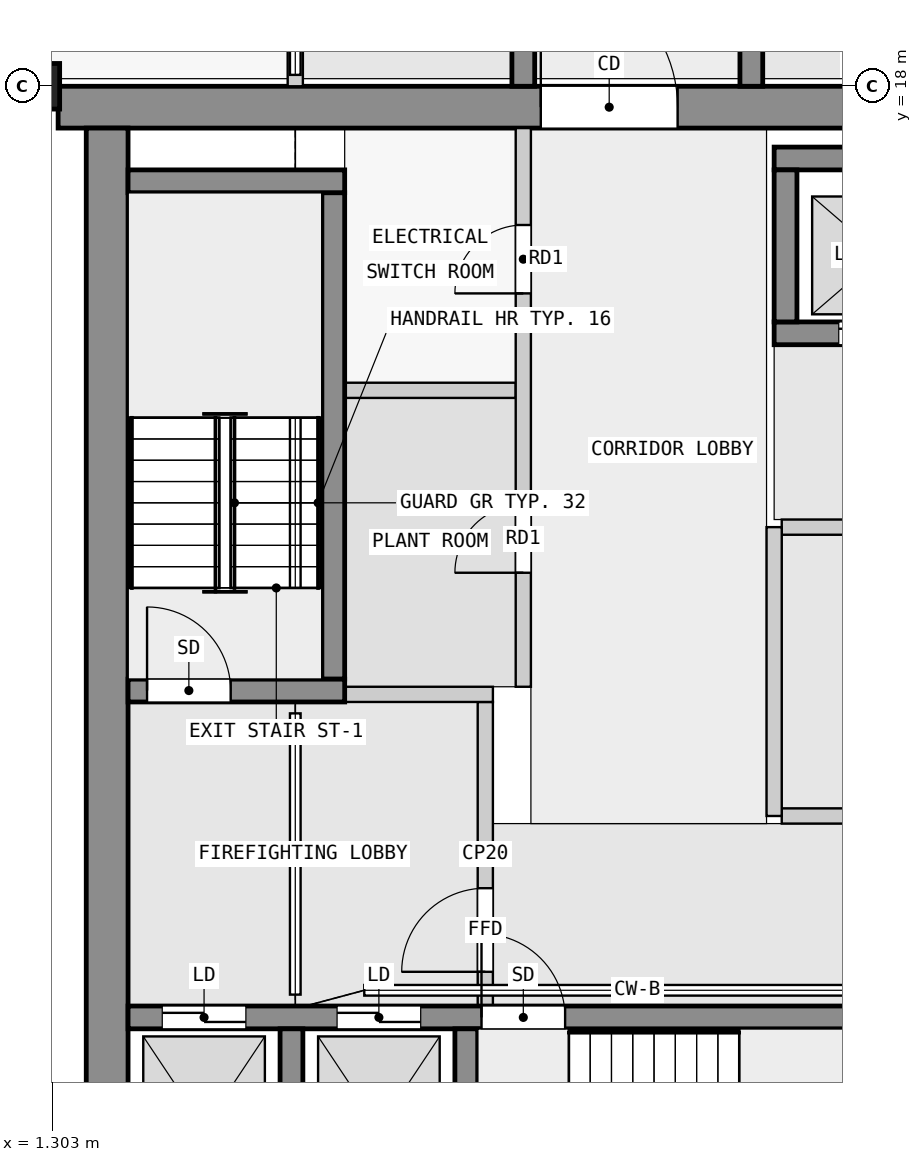
"""IFC4 building model, lengths in metres.
Left out: names, types, materials, properties, quantities, classifications, styles, units other than length and angle.
Written with IfcOpenShell. Run it as: python <this file> out.ifc"""

import sys

from ifc_helpers import new_model, si_unit, direction, frame, frame_2d, origin, origin_2d, place, context, subcontext, project, spatial, rectangle, extrude, element, fill, save


model = new_model("IFC4")
c1 = context("Model", 3, precision=1e-05, world=origin(), true_north=direction((0.0, 1.0)))
c2 = subcontext(c1, "Body", "Model", "MODEL_VIEW")
j1 = project(units=[si_unit("LENGTHUNIT", "METRE"), si_unit("PLANEANGLEUNIT", "RADIAN")], contexts=[c1])
p1 = place(None, origin())
s1 = spatial("IfcSite", under=j1, at=p1, CompositionType="ELEMENT")
p2 = place(p1, origin())
s2 = spatial("IfcBuilding", under=s1, at=p2, CompositionType="ELEMENT")
p3 = place(p2, frame((0.0, 0.0, 184.9)))
s3 = spatial("IfcBuildingStorey", under=s2, at=p3, CompositionType="ELEMENT", Elevation=184.9)
p4 = place(p3, frame((0.7, 18.0, 0.0), z_axis=(0.0, 0.0, 1.0), x_axis=(0.0, 1.0, 0.0)))
e1 = element("IfcColumn", 1, at=p4, inside=s3, PredefinedType="COLUMN", context=c2, shape_type="SweptSolid", body=[
    extrude(rectangle(XDim=0.6, YDim=1.4, at=origin_2d()), origin(), (0.0, 0.0, 1.0), 6.0),
])
p5 = place(p3, frame((1.38, 17.725, 0.0), z_axis=(0.0, 0.0, 1.0), x_axis=(1.0, 0.0, 0.0)))
e2 = element("IfcWall", 2, at=p5, inside=s3, PredefinedType="SHEAR", context=c2, shape_type="SweptSolid", body=[
    extrude(rectangle(XDim=21.12, YDim=0.55, at=frame_2d((10.56, 0.0))), origin(), (0.0, 0.0, 1.0), 5.75),
])
p6 = place(p5, frame((6.35, 0.0, 0.0)))
e3 = element("IfcOpeningElement", 3, at=p6, cuts=e2, PredefinedType="OPENING", context=c2, shape_type="SweptSolid", body=[
    extrude(rectangle(XDim=1.8, YDim=2.1, at=frame_2d((0.9, 1.05))), frame((0.0, 0.285, 0.0), z_axis=(0.0, -1.0, 0.0), x_axis=(1.0, 0.0, 0.0)), (0.0, 0.0, 1.0), 0.57),
])
p7 = place(p3, frame((2.025, 2.5, 0.0), z_axis=(0.0, 0.0, 1.0), x_axis=(0.0, 1.0, 0.0)))
e4 = element("IfcWall", 4, at=p7, inside=s3, PredefinedType="SHEAR", context=c2, shape_type="SweptSolid", body=[
    extrude(rectangle(XDim=14.95, YDim=0.55, at=frame_2d((7.475, 0.0))), origin(), (0.0, 0.0, 1.0), 5.75),
])
for number, where, z_axis, x_axis in (
    (5, (4.45, 2.8, 0.0), (0.0, 0.0, 1.0), (0.0, 1.0, 0.0)),
    (6, (6.75, 2.8, 0.0), (0.0, 0.0, 1.0), (0.0, 1.0, 0.0)),
):
    element("IfcWall", number, at=place(p3, frame(where, z_axis=z_axis, x_axis=x_axis)), inside=s3, PredefinedType="SHEAR", context=c2, shape_type="SweptSolid", body=[
        extrude(rectangle(XDim=2.8, YDim=0.3, at=frame_2d((1.4, 0.0))), origin(), (0.0, 0.0, 1.0), 5.75),
    ])
p8 = place(p3, frame((2.3, 5.75, 0.0), z_axis=(0.0, 0.0, 1.0), x_axis=(1.0, 0.0, 0.0)))
e7 = element("IfcWall", 7, at=p8, inside=s3, PredefinedType="SHEAR", context=c2, shape_type="SweptSolid", body=[
    extrude(rectangle(XDim=18.8, YDim=0.3, at=frame_2d((9.4, 0.0))), origin(), (0.0, 0.0, 1.0), 5.75),
])
p9 = place(p8, frame((4.65, 0.0, 0.0)))
e8 = element("IfcOpeningElement", 8, at=p9, cuts=e7, PredefinedType="OPENING", context=c2, shape_type="SweptSolid", body=[
    extrude(rectangle(XDim=1.1, YDim=2.1, at=frame_2d((0.55, 1.05))), frame((0.0, 0.16, 0.0), z_axis=(0.0, -1.0, 0.0), x_axis=(1.0, 0.0, 0.0)), (0.0, 0.0, 1.0), 0.32),
])
p10 = place(p8, frame((0.45, 0.0, 0.0)))
e9 = element("IfcOpeningElement", 9, at=p10, cuts=e7, PredefinedType="OPENING", context=c2, shape_type="SweptSolid", body=[
    extrude(rectangle(XDim=1.1, YDim=2.1, at=frame_2d((0.55, 1.05))), frame((0.0, 0.16, 0.0), z_axis=(0.0, -1.0, 0.0), x_axis=(1.0, 0.0, 0.0)), (0.0, 0.0, 1.0), 0.32),
])
p11 = place(p8, frame((2.75, 0.0, 0.0)))
e10 = element("IfcOpeningElement", 10, at=p11, cuts=e7, PredefinedType="OPENING", context=c2, shape_type="SweptSolid", body=[
    extrude(rectangle(XDim=1.1, YDim=2.1, at=frame_2d((0.55, 1.05))), frame((0.0, 0.16, 0.0), z_axis=(0.0, -1.0, 0.0), x_axis=(1.0, 0.0, 0.0)), (0.0, 0.0, 1.0), 0.32),
])
p12 = place(p8, frame((14.45, 0.0, 0.0)))
e11 = element("IfcOpeningElement", 11, at=p12, cuts=e7, PredefinedType="OPENING", context=c2, shape_type="SweptSolid", body=[
    extrude(rectangle(XDim=0.9, YDim=2.1, at=frame_2d((0.45, 1.05))), frame((0.0, 0.16, 0.0), z_axis=(0.0, -1.0, 0.0), x_axis=(1.0, 0.0, 0.0)), (0.0, 0.0, 1.0), 0.32),
])
p13 = place(p3, frame((2.3, 10.05, 0.0), z_axis=(0.0, 0.0, 1.0), x_axis=(1.0, 0.0, 0.0)))
e12 = element("IfcWall", 12, at=p13, inside=s3, PredefinedType="SHEAR", context=c2, shape_type="SweptSolid", body=[
    extrude(rectangle(XDim=2.85, YDim=0.3, at=frame_2d((1.425, 0.0))), origin(), (0.0, 0.0, 1.0), 5.75),
])
p14 = place(p13, frame((0.25, 0.0, 0.0)))
e13 = element("IfcOpeningElement", 13, at=p14, cuts=e12, PredefinedType="OPENING", context=c2, shape_type="SweptSolid", body=[
    extrude(rectangle(XDim=1.1, YDim=2.1, at=frame_2d((0.55, 1.05))), frame((0.0, 0.16, 0.0), z_axis=(0.0, -1.0, 0.0), x_axis=(1.0, 0.0, 0.0)), (0.0, 0.0, 1.0), 0.32),
])
p15 = place(p3, frame((5.0, 10.2, 0.0), z_axis=(0.0, 0.0, 1.0), x_axis=(0.0, 1.0, 0.0)))
e14 = element("IfcWall", 14, at=p15, inside=s3, PredefinedType="SHEAR", context=c2, shape_type="SweptSolid", body=[
    extrude(rectangle(XDim=6.4, YDim=0.3, at=frame_2d((3.2, 0.0))), origin(), (0.0, 0.0, 1.0), 5.75),
])
p16 = place(p3, frame((2.3, 16.75, 0.0), z_axis=(0.0, 0.0, 1.0), x_axis=(1.0, 0.0, 0.0)))
e15 = element("IfcWall", 15, at=p16, inside=s3, PredefinedType="SHEAR", context=c2, shape_type="SweptSolid", body=[
    extrude(rectangle(XDim=2.85, YDim=0.3, at=frame_2d((1.425, 0.0))), origin(), (0.0, 0.0, 1.0), 5.75),
])
p17 = place(p3, frame((10.8, 17.05, 0.0), z_axis=(0.0, 0.0, 1.0), x_axis=(1.0, 0.0, 0.0)))
e16 = element("IfcWall", 16, at=p17, inside=s3, PredefinedType="SHEAR", context=c2, shape_type="SweptSolid", body=[
    extrude(rectangle(XDim=7.8, YDim=0.3, at=frame_2d((3.9, 0.0))), origin(), (0.0, 0.0, 1.0), 5.75),
])
p18 = place(p3, frame((10.8, 14.75, 0.0), z_axis=(0.0, 0.0, 1.0), x_axis=(1.0, 0.0, 0.0)))
e17 = element("IfcWall", 17, at=p18, inside=s3, PredefinedType="SHEAR", context=c2, shape_type="SweptSolid", body=[
    extrude(rectangle(XDim=7.8, YDim=0.3, at=frame_2d((3.9, 0.0))), origin(), (0.0, 0.0, 1.0), 5.75),
])
p19 = place(p18, frame((0.85, 0.0, 0.0)))
e18 = element("IfcOpeningElement", 18, at=p19, cuts=e17, PredefinedType="OPENING", context=c2, shape_type="SweptSolid", body=[
    extrude(rectangle(XDim=1.1, YDim=2.1, at=frame_2d((0.55, 1.05))), frame((0.0, 0.16, 0.0), z_axis=(0.0, -1.0, 0.0), x_axis=(1.0, 0.0, 0.0)), (0.0, 0.0, 1.0), 0.32),
])
p20 = place(p18, frame((3.35, 0.0, 0.0)))
e19 = element("IfcOpeningElement", 19, at=p20, cuts=e17, PredefinedType="OPENING", context=c2, shape_type="SweptSolid", body=[
    extrude(rectangle(XDim=1.1, YDim=2.1, at=frame_2d((0.55, 1.05))), frame((0.0, 0.16, 0.0), z_axis=(0.0, -1.0, 0.0), x_axis=(1.0, 0.0, 0.0)), (0.0, 0.0, 1.0), 0.32),
])
p21 = place(p18, frame((5.85, 0.0, 0.0)))
e20 = element("IfcOpeningElement", 20, at=p21, cuts=e17, PredefinedType="OPENING", context=c2, shape_type="SweptSolid", body=[
    extrude(rectangle(XDim=1.1, YDim=2.1, at=frame_2d((0.55, 1.05))), frame((0.0, 0.16, 0.0), z_axis=(0.0, -1.0, 0.0), x_axis=(1.0, 0.0, 0.0)), (0.0, 0.0, 1.0), 0.32),
])
p22 = place(p3, frame((10.95, 14.9, 0.0), z_axis=(0.0, 0.0, 1.0), x_axis=(0.0, 1.0, 0.0)))
e21 = element("IfcWall", 21, at=p22, inside=s3, PredefinedType="SHEAR", context=c2, shape_type="SweptSolid", body=[
    extrude(rectangle(XDim=2.0, YDim=0.3, at=frame_2d((1.0, 0.0))), origin(), (0.0, 0.0, 1.0), 5.75),
])
p23 = place(p3, frame((7.5, 18.0, 0.0), z_axis=(0.0, 0.0, 1.0), x_axis=(0.0, 1.0, 0.0)))
e22 = element("IfcWall", 22, at=p23, inside=s3, PredefinedType="SHEAR", context=c2, shape_type="SweptSolid", body=[
    extrude(rectangle(XDim=27.0, YDim=0.3, at=frame_2d((13.5, 0.0))), origin(), (0.0, 0.0, 1.0), 5.75),
])
p24 = place(p23, frame((24.6, 0.0, 0.0)))
e23 = element("IfcOpeningElement", 23, at=p24, cuts=e22, PredefinedType="OPENING", context=c2, shape_type="SweptSolid", body=[
    extrude(rectangle(XDim=1.8, YDim=2.1, at=frame_2d((0.9, 1.05))), frame((0.0, 0.16, 0.0), z_axis=(0.0, -1.0, 0.0), x_axis=(1.0, 0.0, 0.0)), (0.0, 0.0, 1.0), 0.32),
])
p25 = place(p23, frame((3.85, 0.0, 0.0)))
e24 = element("IfcOpeningElement", 24, at=p25, cuts=e22, PredefinedType="OPENING", context=c2, shape_type="SweptSolid", body=[
    extrude(rectangle(XDim=1.1, YDim=2.1, at=frame_2d((0.55, 1.05))), frame((0.0, 0.16, 0.0), z_axis=(0.0, -1.0, 0.0), x_axis=(1.0, 0.0, 0.0)), (0.0, 0.0, 1.0), 0.32),
])
p26 = place(p23, frame((10.85, 0.0, 0.0)))
e25 = element("IfcOpeningElement", 25, at=p26, cuts=e22, PredefinedType="OPENING", context=c2, shape_type="SweptSolid", body=[
    extrude(rectangle(XDim=1.0, YDim=2.1, at=frame_2d((0.5, 1.05))), frame((0.0, 0.16, 0.0), z_axis=(0.0, -1.0, 0.0), x_axis=(1.0, 0.0, 0.0)), (0.0, 0.0, 1.0), 0.32),
])
p27 = place(p23, frame((14.85, 0.0, 0.0)))
e26 = element("IfcOpeningElement", 26, at=p27, cuts=e22, PredefinedType="OPENING", context=c2, shape_type="SweptSolid", body=[
    extrude(rectangle(XDim=1.6, YDim=2.4, at=frame_2d((0.8, 1.2))), frame((0.0, 0.16, 0.0), z_axis=(0.0, -1.0, 0.0), x_axis=(1.0, 0.0, 0.0)), (0.0, 0.0, 1.0), 0.32),
])
p28 = place(p23, frame((19.85, 0.0, 0.0)))
e27 = element("IfcOpeningElement", 27, at=p28, cuts=e22, PredefinedType="OPENING", context=c2, shape_type="SweptSolid", body=[
    extrude(rectangle(XDim=0.9, YDim=2.1, at=frame_2d((0.45, 1.05))), frame((0.0, 0.16, 0.0), z_axis=(0.0, -1.0, 0.0), x_axis=(1.0, 0.0, 0.0)), (0.0, 0.0, 1.0), 0.32),
])
p29 = place(p3, frame((10.5, 18.0, 0.0), z_axis=(0.0, 0.0, 1.0), x_axis=(0.0, 1.0, 0.0)))
e28 = element("IfcWall", 28, at=p29, inside=s3, PredefinedType="SHEAR", context=c2, shape_type="SweptSolid", body=[
    extrude(rectangle(XDim=27.0, YDim=0.3, at=frame_2d((13.5, 0.0))), origin(), (0.0, 0.0, 1.0), 5.75),
])
p30 = place(p29, frame((3.85, 0.0, 0.0)))
e29 = element("IfcOpeningElement", 29, at=p30, cuts=e28, PredefinedType="OPENING", context=c2, shape_type="SweptSolid", body=[
    extrude(rectangle(XDim=1.1, YDim=2.1, at=frame_2d((0.55, 1.05))), frame((0.0, 0.16, 0.0), z_axis=(0.0, -1.0, 0.0), x_axis=(1.0, 0.0, 0.0)), (0.0, 0.0, 1.0), 0.32),
])
p31 = place(p29, frame((10.85, 0.0, 0.0)))
e30 = element("IfcOpeningElement", 30, at=p31, cuts=e28, PredefinedType="OPENING", context=c2, shape_type="SweptSolid", body=[
    extrude(rectangle(XDim=1.0, YDim=2.1, at=frame_2d((0.5, 1.05))), frame((0.0, 0.16, 0.0), z_axis=(0.0, -1.0, 0.0), x_axis=(1.0, 0.0, 0.0)), (0.0, 0.0, 1.0), 0.32),
])
p32 = place(p29, frame((15.35, 0.0, 0.0)))
e31 = element("IfcOpeningElement", 31, at=p32, cuts=e28, PredefinedType="OPENING", context=c2, shape_type="SweptSolid", body=[
    extrude(rectangle(XDim=1.0, YDim=2.1, at=frame_2d((0.5, 1.05))), frame((0.0, 0.16, 0.0), z_axis=(0.0, -1.0, 0.0), x_axis=(1.0, 0.0, 0.0)), (0.0, 0.0, 1.0), 0.32),
])
p33 = place(p29, frame((19.35, 0.0, 0.0)))
e32 = element("IfcOpeningElement", 32, at=p33, cuts=e28, PredefinedType="OPENING", context=c2, shape_type="SweptSolid", body=[
    extrude(rectangle(XDim=1.6, YDim=2.4, at=frame_2d((0.8, 1.2))), frame((0.0, 0.16, 0.0), z_axis=(0.0, -1.0, 0.0), x_axis=(1.0, 0.0, 0.0)), (0.0, 0.0, 1.0), 0.32),
])
p34 = place(p29, frame((23.85, 0.0, 0.0)))
e33 = element("IfcOpeningElement", 33, at=p34, cuts=e28, PredefinedType="OPENING", context=c2, shape_type="SweptSolid", body=[
    extrude(rectangle(XDim=1.6, YDim=2.4, at=frame_2d((0.8, 1.2))), frame((0.0, 0.16, 0.0), z_axis=(0.0, -1.0, 0.0), x_axis=(1.0, 0.0, 0.0)), (0.0, 0.0, 1.0), 0.32),
])
p35 = place(p3, frame((7.0, 5.9, 0.0), z_axis=(0.0, 0.0, 1.0), x_axis=(0.0, 1.0, 0.0)))
e34 = element("IfcWall", 34, at=p35, inside=s3, PredefinedType="PARTITIONING", context=c2, shape_type="SweptSolid", body=[
    extrude(rectangle(XDim=4.0, YDim=0.2, at=frame_2d((2.0, 0.0))), origin(), (0.0, 0.0, 1.0), 5.75),
])
p36 = place(p35, frame((0.45, 0.0, 0.0)))
e35 = element("IfcOpeningElement", 35, at=p36, cuts=e34, PredefinedType="OPENING", context=c2, shape_type="SweptSolid", body=[
    extrude(rectangle(XDim=1.1, YDim=2.1, at=frame_2d((0.55, 1.05))), frame((0.0, 0.11, 0.0), z_axis=(0.0, -1.0, 0.0), x_axis=(1.0, 0.0, 0.0)), (0.0, 0.0, 1.0), 0.22),
])
p37 = place(p3, frame((5.15, 10.0, 0.0), z_axis=(0.0, 0.0, 1.0), x_axis=(1.0, 0.0, 0.0)))
e36 = element("IfcWall", 36, at=p37, inside=s3, PredefinedType="PARTITIONING", context=c2, shape_type="SweptSolid", body=[
    extrude(rectangle(XDim=1.95, YDim=0.2, at=frame_2d((0.975, 0.0))), origin(), (0.0, 0.0, 1.0), 5.75),
])
p38 = place(p3, frame((10.8, 8.4, 0.0), z_axis=(0.0, 0.0, 1.0), x_axis=(0.0, 1.0, 0.0)))
e37 = element("IfcWall", 37, at=p38, inside=s3, PredefinedType="PARTITIONING", context=c2, shape_type="SweptSolid", body=[
    extrude(rectangle(XDim=3.8, YDim=0.2, at=frame_2d((1.9, 0.0))), origin(), (0.0, 0.0, 1.0), 5.75),
])
p39 = place(p3, frame((10.9, 8.4, 0.0), z_axis=(0.0, 0.0, 1.0), x_axis=(1.0, 0.0, 0.0)))
e38 = element("IfcWall", 38, at=p39, inside=s3, PredefinedType="PARTITIONING", context=c2, shape_type="SweptSolid", body=[
    extrude(rectangle(XDim=6.15, YDim=0.2, at=frame_2d((3.075, 0.0))), origin(), (0.0, 0.0, 1.0), 5.75),
])
p40 = place(p3, frame((10.9, 12.2, 0.0), z_axis=(0.0, 0.0, 1.0), x_axis=(1.0, 0.0, 0.0)))
e39 = element("IfcWall", 39, at=p40, inside=s3, PredefinedType="PARTITIONING", context=c2, shape_type="SweptSolid", body=[
    extrude(rectangle(XDim=6.15, YDim=0.2, at=frame_2d((3.075, 0.0))), origin(), (0.0, 0.0, 1.0), 5.75),
])
p41 = place(p40, frame((2.625, 0.0, 0.0)))
e40 = element("IfcOpeningElement", 40, at=p41, cuts=e39, PredefinedType="OPENING", context=c2, shape_type="SweptSolid", body=[
    extrude(rectangle(XDim=0.9, YDim=2.1, at=frame_2d((0.45, 1.05))), frame((0.0, 0.11, 0.0), z_axis=(0.0, -1.0, 0.0), x_axis=(1.0, 0.0, 0.0)), (0.0, 0.0, 1.0), 0.22),
])
p42 = place(p3, frame((7.5, 10.1, 0.0), z_axis=(0.0, 0.0, 1.0), x_axis=(0.0, 1.0, 0.0)))
e41 = element("IfcWall", 41, at=p42, inside=s3, PredefinedType="PARTITIONING", context=c2, shape_type="SweptSolid", body=[
    extrude(rectangle(XDim=7.35, YDim=0.2, at=frame_2d((3.675, 0.0))), origin(), (0.0, 0.0, 1.0), 5.75),
])
p43 = place(p42, frame((1.5, 0.0, 0.0)))
e42 = element("IfcOpeningElement", 42, at=p43, cuts=e41, PredefinedType="OPENING", context=c2, shape_type="SweptSolid", body=[
    extrude(rectangle(XDim=0.9, YDim=2.1, at=frame_2d((0.45, 1.05))), frame((0.0, 0.11, 0.0), z_axis=(0.0, -1.0, 0.0), x_axis=(1.0, 0.0, 0.0)), (0.0, 0.0, 1.0), 0.22),
])
p44 = place(p42, frame((5.175, 0.0, 0.0)))
e43 = element("IfcOpeningElement", 43, at=p44, cuts=e41, PredefinedType="OPENING", context=c2, shape_type="SweptSolid", body=[
    extrude(rectangle(XDim=0.9, YDim=2.1, at=frame_2d((0.45, 1.05))), frame((0.0, 0.11, 0.0), z_axis=(0.0, -1.0, 0.0), x_axis=(1.0, 0.0, 0.0)), (0.0, 0.0, 1.0), 0.22),
])
p45 = place(p3, frame((5.15, 14.0, 0.0), z_axis=(0.0, 0.0, 1.0), x_axis=(1.0, 0.0, 0.0)))
e44 = element("IfcWall", 44, at=p45, inside=s3, PredefinedType="PARTITIONING", context=c2, shape_type="SweptSolid", body=[
    extrude(rectangle(XDim=2.25, YDim=0.2, at=frame_2d((1.125, 0.0))), origin(), (0.0, 0.0, 1.0), 5.75),
])
p46 = place(p3, frame((4.5, 27.0, 0.0), z_axis=(0.0, 0.0, 1.0), x_axis=(0.0, -1.0, 0.0)))
e45 = element("IfcWall", 45, at=p46, inside=s3, PredefinedType="PARTITIONING", context=c2, shape_type="SweptSolid", body=[
    extrude(rectangle(XDim=9.0, YDim=0.2, at=frame_2d((4.5, 0.0))), origin(), (0.0, 0.0, 1.0), 5.75),
])
p47 = place(p36, origin())
e46 = element("IfcDoor", 46, at=p47, inside=s3, OperationType="SINGLE_SWING_LEFT", PredefinedType="DOOR", context=c2, shape_type="SweptSolid", body=[
    extrude(rectangle(XDim=1.1, YDim=2.1, at=frame_2d((0.55, 1.05))), frame((0.0, 0.025, 0.0), z_axis=(0.0, -1.0, 0.0), x_axis=(1.0, 0.0, 0.0)), (0.0, 0.0, 1.0), 0.05),
])
fill(e35, e46)
p48 = place(p14, origin())
e47 = element("IfcDoor", 47, at=p48, inside=s3, OperationType="SINGLE_SWING_RIGHT", PredefinedType="DOOR", context=c2, shape_type="SweptSolid", body=[
    extrude(rectangle(XDim=1.1, YDim=2.1, at=frame_2d((0.55, 1.05))), frame((0.0, 0.025, 0.0), z_axis=(0.0, -1.0, 0.0), x_axis=(1.0, 0.0, 0.0)), (0.0, 0.0, 1.0), 0.05),
])
fill(e13, e47)
p49 = place(p9, origin())
e48 = element("IfcDoor", 48, at=p49, inside=s3, OperationType="SINGLE_SWING_LEFT", PredefinedType="DOOR", context=c2, shape_type="SweptSolid", body=[
    extrude(rectangle(XDim=1.1, YDim=2.1, at=frame_2d((0.55, 1.05))), frame((0.0, 0.025, 0.0), z_axis=(0.0, -1.0, 0.0), x_axis=(1.0, 0.0, 0.0)), (0.0, 0.0, 1.0), 0.05),
])
fill(e8, e48)
p50 = place(p10, origin())
e49 = element("IfcDoor", 49, at=p50, inside=s3, OperationType="DOUBLE_DOOR_SLIDING", PredefinedType="DOOR", context=c2, shape_type="SweptSolid", body=[
    extrude(rectangle(XDim=1.1, YDim=2.1, at=frame_2d((0.55, 1.05))), frame((0.0, 0.025, 0.0), z_axis=(0.0, -1.0, 0.0), x_axis=(1.0, 0.0, 0.0)), (0.0, 0.0, 1.0), 0.05),
])
fill(e9, e49)
p51 = place(p11, origin())
e50 = element("IfcDoor", 50, at=p51, inside=s3, OperationType="DOUBLE_DOOR_SLIDING", PredefinedType="DOOR", context=c2, shape_type="SweptSolid", body=[
    extrude(rectangle(XDim=1.1, YDim=2.1, at=frame_2d((0.55, 1.05))), frame((0.0, 0.025, 0.0), z_axis=(0.0, -1.0, 0.0), x_axis=(1.0, 0.0, 0.0)), (0.0, 0.0, 1.0), 0.05),
])
fill(e10, e50)
p52 = place(p19, origin())
e51 = element("IfcDoor", 51, at=p52, inside=s3, OperationType="DOUBLE_DOOR_SLIDING", PredefinedType="DOOR", context=c2, shape_type="SweptSolid", body=[
    extrude(rectangle(XDim=1.1, YDim=2.1, at=frame_2d((0.55, 1.05))), frame((0.0, 0.025, 0.0), z_axis=(0.0, -1.0, 0.0), x_axis=(1.0, 0.0, 0.0)), (0.0, 0.0, 1.0), 0.05),
])
fill(e18, e51)
p53 = place(p6, origin())
e52 = element("IfcDoor", 52, at=p53, inside=s3, OperationType="DOUBLE_DOOR_SINGLE_SWING", PredefinedType="DOOR", context=c2, shape_type="SweptSolid", body=[
    extrude(rectangle(XDim=1.8, YDim=2.1, at=frame_2d((0.9, 1.05))), frame((0.0, 0.025, 0.0), z_axis=(0.0, -1.0, 0.0), x_axis=(1.0, 0.0, 0.0)), (0.0, 0.0, 1.0), 0.05),
])
fill(e3, e52)
p54 = place(p43, origin())
e53 = element("IfcDoor", 53, at=p54, inside=s3, OperationType="SINGLE_SWING_RIGHT", PredefinedType="DOOR", context=c2, shape_type="SweptSolid", body=[
    extrude(rectangle(XDim=0.9, YDim=2.1, at=frame_2d((0.45, 1.05))), frame((0.0, 0.025, 0.0), z_axis=(0.0, -1.0, 0.0), x_axis=(1.0, 0.0, 0.0)), (0.0, 0.0, 1.0), 0.05),
])
fill(e42, e53)
p55 = place(p44, origin())
e54 = element("IfcDoor", 54, at=p55, inside=s3, OperationType="SINGLE_SWING_RIGHT", PredefinedType="DOOR", context=c2, shape_type="SweptSolid", body=[
    extrude(rectangle(XDim=0.9, YDim=2.1, at=frame_2d((0.45, 1.05))), frame((0.0, 0.025, 0.0), z_axis=(0.0, -1.0, 0.0), x_axis=(1.0, 0.0, 0.0)), (0.0, 0.0, 1.0), 0.05),
])
fill(e43, e54)
save(model, sys.argv[1])
